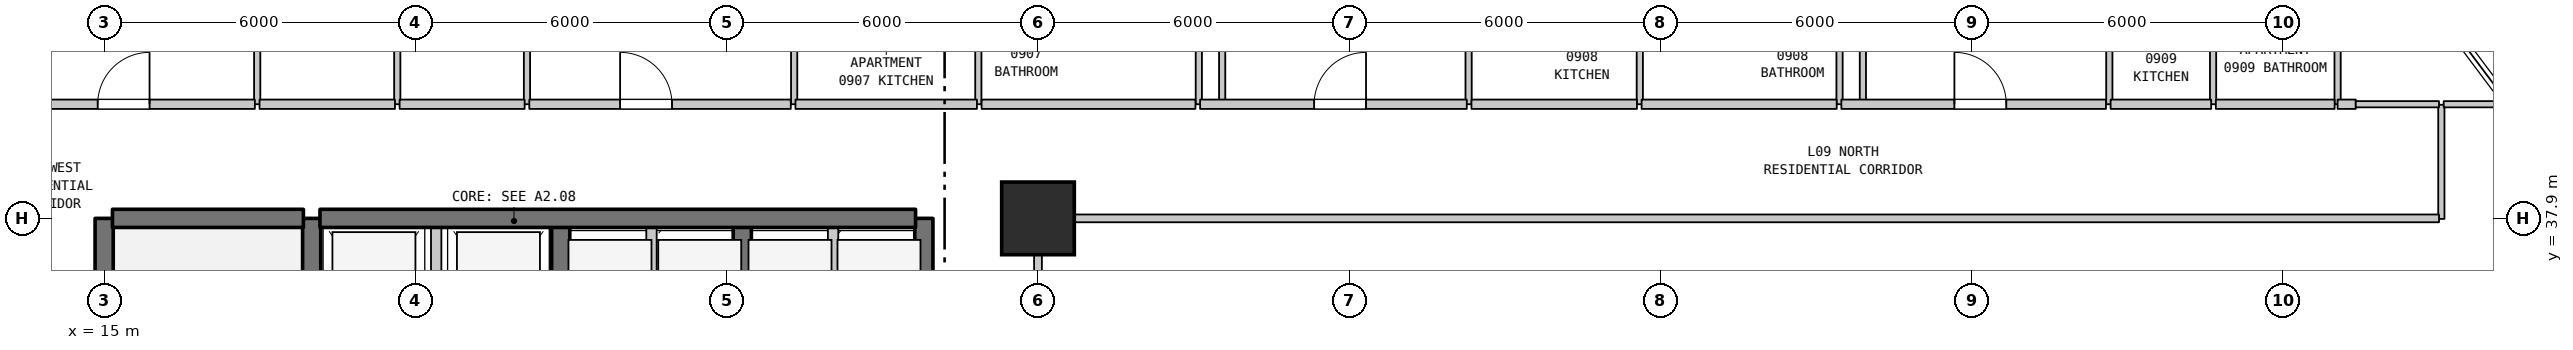
"""IFC4 building model, lengths in metres.
Left out: names, types, materials, properties, quantities, classifications, styles, units other than length and angle.
Written with IfcOpenShell. Run it as: python <this file> out.ifc"""

import sys

from ifc_helpers import new_model, si_unit, direction, frame, frame_2d, origin, origin_2d, place, context, subcontext, project, spatial, rectangle, extrude, element, fill, save


model = new_model("IFC4")
c1 = context("Model", 3, precision=1e-05, world=origin(), true_north=direction((0.0, 1.0)))
c2 = subcontext(c1, "Body", "Model", "MODEL_VIEW")
j1 = project(units=[si_unit("LENGTHUNIT", "METRE"), si_unit("PLANEANGLEUNIT", "RADIAN")], contexts=[c1])
p1 = place(None, origin())
s1 = spatial("IfcSite", under=j1, at=p1, CompositionType="ELEMENT")
p2 = place(p1, origin())
s2 = spatial("IfcBuilding", under=s1, at=p2, CompositionType="ELEMENT")
p3 = place(p2, frame((0.0, 0.0, 42.5)))
s3 = spatial("IfcBuildingStorey", under=s2, at=p3, CompositionType="ELEMENT", Elevation=42.5)
p4 = place(p3, frame((33.0, 37.9, 0.0), z_axis=(0.0, 0.0, 1.0), x_axis=(1.0, 0.0, 0.0)))
e1 = element("IfcColumn", 1, at=p4, inside=s3, PredefinedType="COLUMN", context=c2, shape_type="SweptSolid", body=[
    extrude(rectangle(XDim=1.4, YDim=1.4, at=origin_2d()), origin(), (0.0, 0.0, 1.0), 3.7),
])
p5 = place(p3, frame((15.0, 31.1, 0.0), z_axis=(0.0, 0.0, 1.0), x_axis=(0.0, 1.0, 0.0)))
e2 = element("IfcWall", 2, at=p5, inside=s3, PredefinedType="SHEAR", context=c2, shape_type="SweptSolid", body=[
    extrude(rectangle(XDim=6.8, YDim=0.35, at=frame_2d((3.4, 0.0))), origin(), (0.0, 0.0, 1.0), 3.385),
])
p6 = place(p3, frame((17.95, 40.1, 0.0), z_axis=(0.0, 0.0, 1.0), x_axis=(0.0, 1.0, 0.0)))
e3 = element("IfcWall", 3, at=p6, inside=s3, PredefinedType="PARTITIONING", context=c2, shape_type="SweptSolid", body=[
    extrude(rectangle(XDim=3.2, YDim=0.12, at=frame_2d((1.6, 0.0))), origin(), (0.0, 0.0, 1.0), 3.385),
])
p7 = place(p3, frame((19.0, 35.0, 0.0), z_axis=(0.0, 0.0, 1.0), x_axis=(0.0, 1.0, 0.0)))
e4 = element("IfcWall", 4, at=p7, inside=s3, PredefinedType="SHEAR", context=c2, shape_type="SweptSolid", body=[
    extrude(rectangle(XDim=2.9, YDim=0.35, at=frame_2d((1.45, 0.0))), origin(), (0.0, 0.0, 1.0), 3.385),
])
p8 = place(p3, frame((20.65, 40.1, 0.0), z_axis=(0.0, 0.0, 1.0), x_axis=(0.0, 1.0, 0.0)))
e5 = element("IfcWall", 5, at=p8, inside=s3, PredefinedType="PARTITIONING", context=c2, shape_type="SweptSolid", body=[
    extrude(rectangle(XDim=3.2, YDim=0.12, at=frame_2d((1.6, 0.0))), origin(), (0.0, 0.0, 1.0), 3.385),
])
p9 = place(p8, frame((1.15, 0.0, 0.0)))
e6 = element("IfcOpeningElement", 6, at=p9, cuts=e5, PredefinedType="OPENING", context=c2, shape_type="SweptSolid", body=[
    extrude(rectangle(XDim=0.9, YDim=2.15, at=frame_2d((0.45, 1.075))), frame((0.0, 0.07, 0.0), z_axis=(0.0, -1.0, 0.0), x_axis=(1.0, 0.0, 0.0)), (0.0, 0.0, 1.0), 0.14),
])
p10 = place(p3, frame((21.4, 35.0, 0.0), z_axis=(0.0, 0.0, 1.0), x_axis=(0.0, 1.0, 0.0)))
e7 = element("IfcWall", 7, at=p10, inside=s3, PredefinedType="STANDARD", context=c2, shape_type="SweptSolid", body=[
    extrude(rectangle(XDim=2.9, YDim=0.2, at=frame_2d((1.45, 0.0))), origin(), (0.0, 0.0, 1.0), 3.385),
])
p11 = place(p3, frame((23.15, 40.1, 0.0), z_axis=(0.0, 0.0, 1.0), x_axis=(0.0, 1.0, 0.0)))
e8 = element("IfcWall", 8, at=p11, inside=s3, PredefinedType="PARTITIONING", context=c2, shape_type="SweptSolid", body=[
    extrude(rectangle(XDim=2.05, YDim=0.12, at=frame_2d((1.025, 0.0))), origin(), (0.0, 0.0, 1.0), 3.385),
])
p12 = place(p3, frame((23.8, 35.0, 0.0), z_axis=(0.0, 0.0, 1.0), x_axis=(0.0, 1.0, 0.0)))
e9 = element("IfcWall", 9, at=p12, inside=s3, PredefinedType="SHEAR", context=c2, shape_type="SweptSolid", body=[
    extrude(rectangle(XDim=2.9, YDim=0.35, at=frame_2d((1.45, 0.0))), origin(), (0.0, 0.0, 1.0), 3.385),
])
p13 = place(p3, frame((25.55, 35.0, 0.0), z_axis=(0.0, 0.0, 1.0), x_axis=(0.0, 1.0, 0.0)))
e10 = element("IfcWall", 10, at=p13, inside=s3, PredefinedType="STANDARD", context=c2, shape_type="SweptSolid", body=[
    extrude(rectangle(XDim=2.9, YDim=0.2, at=frame_2d((1.45, 0.0))), origin(), (0.0, 0.0, 1.0), 3.385),
])
p14 = place(p3, frame((27.3, 35.0, 0.0), z_axis=(0.0, 0.0, 1.0), x_axis=(0.0, 1.0, 0.0)))
e11 = element("IfcWall", 11, at=p14, inside=s3, PredefinedType="SHEAR", context=c2, shape_type="SweptSolid", body=[
    extrude(rectangle(XDim=2.9, YDim=0.35, at=frame_2d((1.45, 0.0))), origin(), (0.0, 0.0, 1.0), 3.385),
])
p15 = place(p3, frame((28.3, 40.1, 0.0), z_axis=(0.0, 0.0, 1.0), x_axis=(0.0, 1.0, 0.0)))
e12 = element("IfcWall", 12, at=p15, inside=s3, PredefinedType="PARTITIONING", context=c2, shape_type="SweptSolid", body=[
    extrude(rectangle(XDim=2.3, YDim=0.12, at=frame_2d((1.15, 0.0))), origin(), (0.0, 0.0, 1.0), 3.385),
])
p16 = place(p3, frame((29.05, 35.0, 0.0), z_axis=(0.0, 0.0, 1.0), x_axis=(0.0, 1.0, 0.0)))
e13 = element("IfcWall", 13, at=p16, inside=s3, PredefinedType="STANDARD", context=c2, shape_type="SweptSolid", body=[
    extrude(rectangle(XDim=2.9, YDim=0.2, at=frame_2d((1.45, 0.0))), origin(), (0.0, 0.0, 1.0), 3.385),
])
p17 = place(p3, frame((30.8, 35.0, 0.0), z_axis=(0.0, 0.0, 1.0), x_axis=(0.0, 1.0, 0.0)))
e14 = element("IfcWall", 14, at=p17, inside=s3, PredefinedType="SHEAR", context=c2, shape_type="SweptSolid", body=[
    extrude(rectangle(XDim=2.9, YDim=0.35, at=frame_2d((1.45, 0.0))), origin(), (0.0, 0.0, 1.0), 3.385),
])
p18 = place(p3, frame((31.85, 40.1, 0.0), z_axis=(0.0, 0.0, 1.0), x_axis=(0.0, 1.0, 0.0)))
e15 = element("IfcWall", 15, at=p18, inside=s3, PredefinedType="PARTITIONING", context=c2, shape_type="SweptSolid", body=[
    extrude(rectangle(XDim=2.3, YDim=0.12, at=frame_2d((1.15, 0.0))), origin(), (0.0, 0.0, 1.0), 3.385),
])
p19 = place(p3, frame((33.0, 27.91, 0.0), z_axis=(0.0, 0.0, 1.0), x_axis=(0.0, 1.0, 0.0)))
e16 = element("IfcWall", 16, at=p19, inside=s3, PredefinedType="STANDARD", context=c2, shape_type="SweptSolid", body=[
    extrude(rectangle(XDim=9.98, YDim=0.15, at=frame_2d((4.99, 0.0))), origin(), (0.0, 0.0, 1.0), 2.885),
])
p20 = place(p3, frame((36.1, 40.1, 0.0), z_axis=(0.0, 0.0, 1.0), x_axis=(0.0, 1.0, 0.0)))
e17 = element("IfcWall", 17, at=p20, inside=s3, PredefinedType="PARTITIONING", context=c2, shape_type="SweptSolid", body=[
    extrude(rectangle(XDim=2.3, YDim=0.12, at=frame_2d((1.15, 0.0))), origin(), (0.0, 0.0, 1.0), 3.385),
])
p21 = place(p3, frame((36.55, 40.1, 0.0), z_axis=(0.0, 0.0, 1.0), x_axis=(0.0, 1.0, 0.0)))
e18 = element("IfcWall", 18, at=p21, inside=s3, PredefinedType="PARTITIONING", context=c2, shape_type="SweptSolid", body=[
    extrude(rectangle(XDim=13.79, YDim=0.12, at=frame_2d((6.895, 0.0))), origin(), (0.0, 0.0, 1.0), 3.385),
])
for number, where, z_axis, x_axis in (
    (19, (41.3, 40.1, 0.0), (0.0, 0.0, 1.0), (0.0, 1.0, 0.0)),
    (20, (44.6, 40.1, 0.0), (0.0, 0.0, 1.0), (0.0, 1.0, 0.0)),
    (21, (48.45, 40.1, 0.0), (0.0, 0.0, 1.0), (0.0, 1.0, 0.0)),
):
    element("IfcWall", number, at=place(p3, frame(where, z_axis=z_axis, x_axis=x_axis)), inside=s3, PredefinedType="PARTITIONING", context=c2, shape_type="SweptSolid", body=[
        extrude(rectangle(XDim=2.3, YDim=0.12, at=frame_2d((1.15, 0.0))), origin(), (0.0, 0.0, 1.0), 3.385),
    ])
p22 = place(p3, frame((48.9, 40.1, 0.0), z_axis=(0.0, 0.0, 1.0), x_axis=(0.0, 1.0, 0.0)))
e22 = element("IfcWall", 22, at=p22, inside=s3, PredefinedType="PARTITIONING", context=c2, shape_type="SweptSolid", body=[
    extrude(rectangle(XDim=13.79, YDim=0.12, at=frame_2d((6.895, 0.0))), origin(), (0.0, 0.0, 1.0), 3.385),
])
for number, where, z_axis, x_axis in (
    (23, (53.65, 40.1, 0.0), (0.0, 0.0, 1.0), (0.0, 1.0, 0.0)),
    (24, (55.65, 40.1, 0.0), (0.0, 0.0, 1.0), (0.0, 1.0, 0.0)),
    (25, (58.05, 40.1, 0.0), (0.0, 0.0, 1.0), (0.0, 1.0, 0.0)),
):
    element("IfcWall", number, at=place(p3, frame(where, z_axis=z_axis, x_axis=x_axis)), inside=s3, PredefinedType="PARTITIONING", context=c2, shape_type="SweptSolid", body=[
        extrude(rectangle(XDim=2.3, YDim=0.12, at=frame_2d((1.15, 0.0))), origin(), (0.0, 0.0, 1.0), 3.385),
    ])
p23 = place(p3, frame((60.05, 37.89, 0.0), z_axis=(0.0, 0.0, 1.0), x_axis=(0.0, 1.0, 0.0)))
e26 = element("IfcWall", 26, at=p23, inside=s3, PredefinedType="PARTITIONING", context=c2, shape_type="SweptSolid", body=[
    extrude(rectangle(XDim=2.2, YDim=0.12, at=frame_2d((1.1, 0.0))), origin(), (0.0, 0.0, 1.0), 3.385),
])
p24 = place(p3, frame((15.16, 37.9, 0.0), z_axis=(0.0, 0.0, 1.0), x_axis=(1.0, 0.0, 0.0)))
e27 = element("IfcWall", 27, at=p24, inside=s3, PredefinedType="SHEAR", context=c2, shape_type="SweptSolid", body=[
    extrude(rectangle(XDim=3.68, YDim=0.35, at=frame_2d((1.84, 0.0))), origin(), (0.0, 0.0, 1.0), 3.385),
])
p25 = place(p3, frame((19.16, 37.9, 0.0), z_axis=(0.0, 0.0, 1.0), x_axis=(1.0, 0.0, 0.0)))
e28 = element("IfcWall", 28, at=p25, inside=s3, PredefinedType="SHEAR", context=c2, shape_type="SweptSolid", body=[
    extrude(rectangle(XDim=11.48, YDim=0.35, at=frame_2d((5.74, 0.0))), origin(), (0.0, 0.0, 1.0), 3.385),
])
p26 = place(p3, frame((33.07, 37.9, 0.0), z_axis=(0.0, 0.0, 1.0), x_axis=(1.0, 0.0, 0.0)))
e29 = element("IfcWall", 29, at=p26, inside=s3, PredefinedType="STANDARD", context=c2, shape_type="SweptSolid", body=[
    extrude(rectangle(XDim=26.935, YDim=0.15, at=frame_2d((13.467, 0.0))), origin(), (0.0, 0.0, 1.0), 3.385),
])
p27 = place(p3, frame((12.875, 40.1, 0.0), z_axis=(0.0, 0.0, 1.0), x_axis=(1.0, 0.0, 0.0)))
e30 = element("IfcWall", 30, at=p27, inside=s3, PredefinedType="STANDARD", context=c2, shape_type="SweptSolid", body=[
    extrude(rectangle(XDim=5.03, YDim=0.18, at=frame_2d((2.515, 0.0))), origin(), (0.0, 0.0, 1.0), 3.385),
])
p28 = place(p27, frame((2.0, 0.0, 0.0)))
e31 = element("IfcOpeningElement", 31, at=p28, cuts=e30, PredefinedType="OPENING", context=c2, shape_type="SweptSolid", body=[
    extrude(rectangle(XDim=1.0, YDim=2.15, at=frame_2d((0.5, 1.075))), frame((0.0, 0.1, 0.0), z_axis=(0.0, -1.0, 0.0), x_axis=(1.0, 0.0, 0.0)), (0.0, 0.0, 1.0), 0.2),
])
p29 = place(p3, frame((17.995, 40.1, 0.0), z_axis=(0.0, 0.0, 1.0), x_axis=(1.0, 0.0, 0.0)))
e32 = element("IfcWall", 32, at=p29, inside=s3, PredefinedType="STANDARD", context=c2, shape_type="SweptSolid", body=[
    extrude(rectangle(XDim=2.61, YDim=0.18, at=frame_2d((1.305, 0.0))), origin(), (0.0, 0.0, 1.0), 3.385),
])
p30 = place(p3, frame((20.695, 40.1, 0.0), z_axis=(0.0, 0.0, 1.0), x_axis=(1.0, 0.0, 0.0)))
e33 = element("IfcWall", 33, at=p30, inside=s3, PredefinedType="STANDARD", context=c2, shape_type="SweptSolid", body=[
    extrude(rectangle(XDim=2.41, YDim=0.18, at=frame_2d((1.205, 0.0))), origin(), (0.0, 0.0, 1.0), 3.385),
])
p31 = place(p3, frame((23.195, 40.1, 0.0), z_axis=(0.0, 0.0, 1.0), x_axis=(1.0, 0.0, 0.0)))
e34 = element("IfcWall", 34, at=p31, inside=s3, PredefinedType="STANDARD", context=c2, shape_type="SweptSolid", body=[
    extrude(rectangle(XDim=5.04, YDim=0.18, at=frame_2d((2.52, 0.0))), origin(), (0.0, 0.0, 1.0), 3.385),
])
p32 = place(p31, frame((1.75, 0.0, 0.0)))
e35 = element("IfcOpeningElement", 35, at=p32, cuts=e34, PredefinedType="OPENING", context=c2, shape_type="SweptSolid", body=[
    extrude(rectangle(XDim=1.0, YDim=2.15, at=frame_2d((0.5, 1.075))), frame((0.0, 0.1, 0.0), z_axis=(0.0, -1.0, 0.0), x_axis=(1.0, 0.0, 0.0)), (0.0, 0.0, 1.0), 0.2),
])
p33 = place(p3, frame((28.325, 40.1, 0.0), z_axis=(0.0, 0.0, 1.0), x_axis=(1.0, 0.0, 0.0)))
e36 = element("IfcWall", 36, at=p33, inside=s3, PredefinedType="STANDARD", context=c2, shape_type="SweptSolid", body=[
    extrude(rectangle(XDim=3.498, YDim=0.18, at=frame_2d((1.749, 0.0))), origin(), (0.0, 0.0, 1.0), 3.385),
])
p34 = place(p3, frame((31.913, 40.1, 0.0), z_axis=(0.0, 0.0, 1.0), x_axis=(1.0, 0.0, 0.0)))
e37 = element("IfcWall", 37, at=p34, inside=s3, PredefinedType="STANDARD", context=c2, shape_type="SweptSolid", body=[
    extrude(rectangle(XDim=4.122, YDim=0.18, at=frame_2d((2.061, 0.0))), origin(), (0.0, 0.0, 1.0), 3.385),
])
p35 = place(p3, frame((36.125, 40.1, 0.0), z_axis=(0.0, 0.0, 1.0), x_axis=(1.0, 0.0, 0.0)))
e38 = element("IfcWall", 38, at=p35, inside=s3, PredefinedType="STANDARD", context=c2, shape_type="SweptSolid", body=[
    extrude(rectangle(XDim=5.14, YDim=0.18, at=frame_2d((2.57, 0.0))), origin(), (0.0, 0.0, 1.0), 3.385),
])
p36 = place(p35, frame((2.198, 0.0, 0.0)))
e39 = element("IfcOpeningElement", 39, at=p36, cuts=e38, PredefinedType="OPENING", context=c2, shape_type="SweptSolid", body=[
    extrude(rectangle(XDim=1.0, YDim=2.15, at=frame_2d((0.5, 1.075))), frame((0.0, 0.1, 0.0), z_axis=(0.0, -1.0, 0.0), x_axis=(1.0, 0.0, 0.0)), (0.0, 0.0, 1.0), 0.2),
])
p37 = place(p3, frame((41.355, 40.1, 0.0), z_axis=(0.0, 0.0, 1.0), x_axis=(1.0, 0.0, 0.0)))
e40 = element("IfcWall", 40, at=p37, inside=s3, PredefinedType="STANDARD", context=c2, shape_type="SweptSolid", body=[
    extrude(rectangle(XDim=3.19, YDim=0.18, at=frame_2d((1.595, 0.0))), origin(), (0.0, 0.0, 1.0), 3.385),
])
p38 = place(p3, frame((44.635, 40.1, 0.0), z_axis=(0.0, 0.0, 1.0), x_axis=(1.0, 0.0, 0.0)))
e41 = element("IfcWall", 41, at=p38, inside=s3, PredefinedType="STANDARD", context=c2, shape_type="SweptSolid", body=[
    extrude(rectangle(XDim=3.76, YDim=0.18, at=frame_2d((1.88, 0.0))), origin(), (0.0, 0.0, 1.0), 3.385),
])
p39 = place(p3, frame((48.485, 40.1, 0.0), z_axis=(0.0, 0.0, 1.0), x_axis=(1.0, 0.0, 0.0)))
e42 = element("IfcWall", 42, at=p39, inside=s3, PredefinedType="STANDARD", context=c2, shape_type="SweptSolid", body=[
    extrude(rectangle(XDim=5.1, YDim=0.18, at=frame_2d((2.55, 0.0))), origin(), (0.0, 0.0, 1.0), 3.385),
])
p40 = place(p39, frame((2.179, 0.0, 0.0)))
e43 = element("IfcOpeningElement", 43, at=p40, cuts=e42, PredefinedType="OPENING", context=c2, shape_type="SweptSolid", body=[
    extrude(rectangle(XDim=1.0, YDim=2.15, at=frame_2d((0.5, 1.075))), frame((0.0, 0.1, 0.0), z_axis=(0.0, -1.0, 0.0), x_axis=(1.0, 0.0, 0.0)), (0.0, 0.0, 1.0), 0.2),
])
p41 = place(p3, frame((53.675, 40.1, 0.0), z_axis=(0.0, 0.0, 1.0), x_axis=(1.0, 0.0, 0.0)))
e44 = element("IfcWall", 44, at=p41, inside=s3, PredefinedType="STANDARD", context=c2, shape_type="SweptSolid", body=[
    extrude(rectangle(XDim=1.938, YDim=0.18, at=frame_2d((0.969, 0.0))), origin(), (0.0, 0.0, 1.0), 3.385),
])
p42 = place(p3, frame((55.703, 40.1, 0.0), z_axis=(0.0, 0.0, 1.0), x_axis=(1.0, 0.0, 0.0)))
e45 = element("IfcWall", 45, at=p42, inside=s3, PredefinedType="STANDARD", context=c2, shape_type="SweptSolid", body=[
    extrude(rectangle(XDim=2.29, YDim=0.18, at=frame_2d((1.145, 0.0))), origin(), (0.0, 0.0, 1.0), 3.385),
])
p43 = place(p3, frame((58.05, 40.1, 0.0), z_axis=(0.0, 0.0, 1.0), x_axis=(1.0, 0.0, 0.0)))
e46 = element("IfcWall", 46, at=p43, inside=s3, PredefinedType="STANDARD", context=c2, shape_type="SweptSolid", body=[
    extrude(rectangle(XDim=0.35, YDim=0.18, at=frame_2d((0.175, 0.0))), origin(), (0.0, 0.0, 1.0), 3.385),
])
p44 = place(p3, frame((58.4, 40.1, 0.0), z_axis=(0.0, 0.0, 1.0), x_axis=(1.0, 0.0, 0.0)))
e47 = element("IfcWall", 47, at=p44, inside=s3, PredefinedType="PARTITIONING", context=c2, shape_type="SweptSolid", body=[
    extrude(rectangle(XDim=1.605, YDim=0.12, at=frame_2d((0.802, 0.0))), origin(), (0.0, 0.0, 1.0), 3.385),
])
p45 = place(p3, frame((60.095, 40.1, 0.0), z_axis=(0.0, 0.0, 1.0), x_axis=(1.0, 0.0, 0.0)))
e48 = element("IfcWall", 48, at=p45, inside=s3, PredefinedType="PARTITIONING", context=c2, shape_type="SweptSolid", body=[
    extrude(rectangle(XDim=1.245, YDim=0.12, at=frame_2d((0.623, 0.0))), origin(), (0.0, 0.0, 1.0), 3.385),
])
p46 = place(p28, origin())
e49 = element("IfcDoor", 49, at=p46, inside=s3, OperationType="SINGLE_SWING_RIGHT", PredefinedType="DOOR", context=c2, shape_type="SweptSolid", body=[
    extrude(rectangle(XDim=1.0, YDim=2.15, at=frame_2d((0.5, 1.075))), frame((0.0, 0.025, 0.0), z_axis=(0.0, -1.0, 0.0), x_axis=(1.0, 0.0, 0.0)), (0.0, 0.0, 1.0), 0.05),
])
fill(e31, e49)
p47 = place(p32, origin())
e50 = element("IfcDoor", 50, at=p47, inside=s3, OperationType="SINGLE_SWING_LEFT", PredefinedType="DOOR", context=c2, shape_type="SweptSolid", body=[
    extrude(rectangle(XDim=1.0, YDim=2.15, at=frame_2d((0.5, 1.075))), frame((0.0, 0.025, 0.0), z_axis=(0.0, -1.0, 0.0), x_axis=(1.0, 0.0, 0.0)), (0.0, 0.0, 1.0), 0.05),
])
fill(e35, e50)
p48 = place(p36, origin())
e51 = element("IfcDoor", 51, at=p48, inside=s3, OperationType="SINGLE_SWING_RIGHT", PredefinedType="DOOR", context=c2, shape_type="SweptSolid", body=[
    extrude(rectangle(XDim=1.0, YDim=2.15, at=frame_2d((0.5, 1.075))), frame((0.0, 0.025, 0.0), z_axis=(0.0, -1.0, 0.0), x_axis=(1.0, 0.0, 0.0)), (0.0, 0.0, 1.0), 0.05),
])
fill(e39, e51)
p49 = place(p40, origin())
e52 = element("IfcDoor", 52, at=p49, inside=s3, OperationType="SINGLE_SWING_LEFT", PredefinedType="DOOR", context=c2, shape_type="SweptSolid", body=[
    extrude(rectangle(XDim=1.0, YDim=2.15, at=frame_2d((0.5, 1.075))), frame((0.0, 0.025, 0.0), z_axis=(0.0, -1.0, 0.0), x_axis=(1.0, 0.0, 0.0)), (0.0, 0.0, 1.0), 0.05),
])
fill(e43, e52)
save(model, sys.argv[1])
